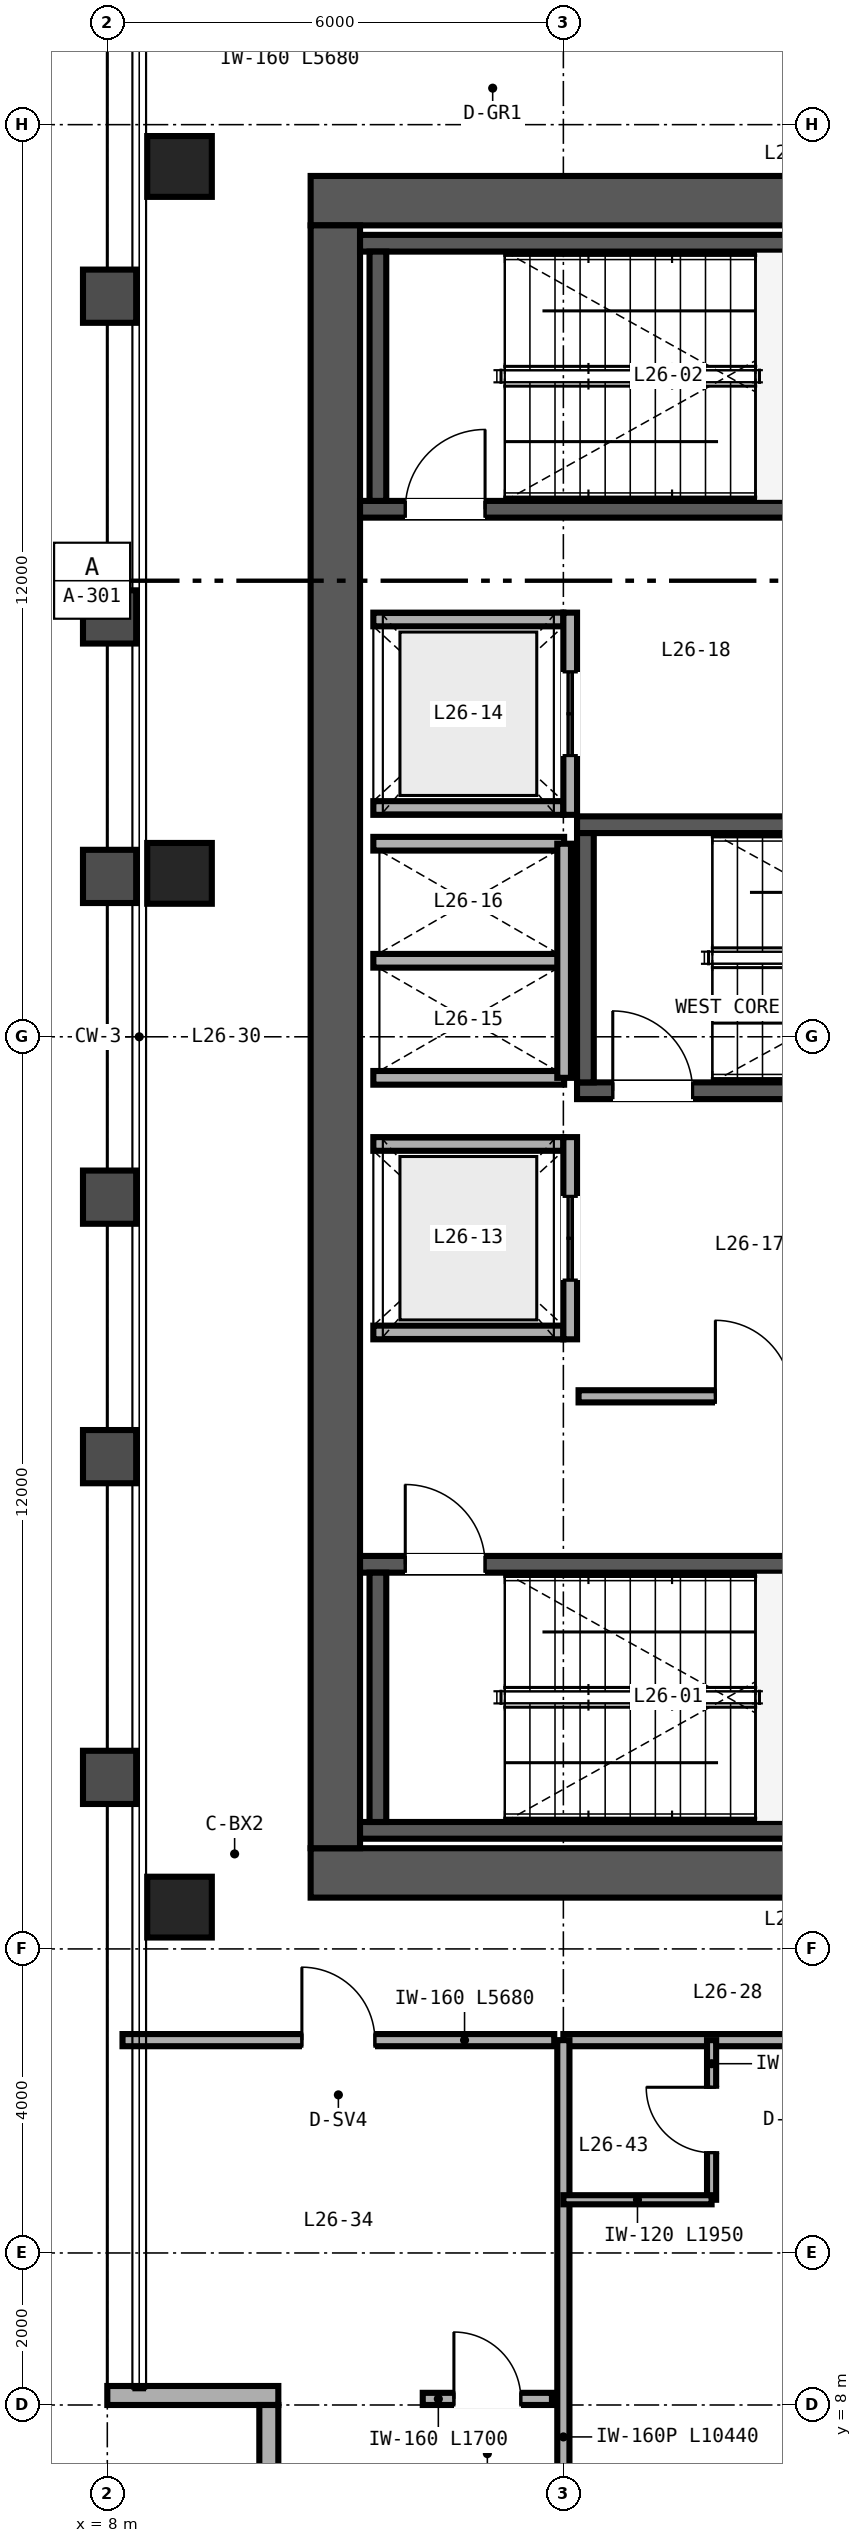
"""IFC4 building model, lengths in metres.
Left out: names, types, materials, properties, quantities, classifications, styles, units other than length and angle.
Written with IfcOpenShell. Run it as: python <this file> out.ifc"""

import sys

from ifc_helpers import new_model, si_unit, direction, frame, frame_2d, origin, origin_2d, place, context, subcontext, project, spatial, rectangle, hollow_rectangle, extrude, source, transform, mapped, element, fill, save


model = new_model("IFC4")
c1 = context("Model", 3, precision=1e-05, world=origin(), true_north=direction((0.0, 1.0)))
c2 = subcontext(c1, "Body", "Model", "MODEL_VIEW")
j1 = project(units=[si_unit("LENGTHUNIT", "METRE"), si_unit("PLANEANGLEUNIT", "RADIAN")], contexts=[c1])
p1 = place(None, origin())
s1 = spatial("IfcSite", under=j1, at=p1, CompositionType="ELEMENT")
p2 = place(p1, origin())
s2 = spatial("IfcBuilding", under=s1, at=p2, CompositionType="ELEMENT")
p3 = place(p2, frame((0.0, 0.0, 108.0)))
s3 = spatial("IfcBuildingStorey", under=s2, at=p3, CompositionType="ELEMENT", Elevation=108.0)
p4 = place(p3, frame((10.675, 15.0, 0.0), z_axis=(0.0, 0.0, 1.0), x_axis=(1.0, 0.0, 0.0)))
e1 = element("IfcWall", 1, at=p4, inside=s3, PredefinedType="SHEAR", context=c2, shape_type="SweptSolid", body=[
    extrude(rectangle(XDim=12.65, YDim=0.65, at=frame_2d((6.325, 0.0))), origin(), (0.0, 0.0, 1.0), 3.36),
])
p5 = place(p4, frame((10.225, 0.0, 0.0)))
e2 = element("IfcOpeningElement", 2, at=p5, cuts=e1, PredefinedType="OPENING", context=c2, shape_type="SweptSolid", body=[
    extrude(rectangle(XDim=1.0, YDim=2.15, at=frame_2d((0.5, 1.075))), frame((0.0, 0.335, 0.0), z_axis=(0.0, -1.0, 0.0), x_axis=(1.0, 0.0, 0.0)), (0.0, 0.0, 1.0), 0.67),
])
p6 = place(p3, frame((10.675, 37.0, 0.0), z_axis=(0.0, 0.0, 1.0), x_axis=(1.0, 0.0, 0.0)))
e3 = element("IfcWall", 3, at=p6, inside=s3, PredefinedType="SHEAR", context=c2, shape_type="SweptSolid", body=[
    extrude(rectangle(XDim=12.65, YDim=0.65, at=frame_2d((6.325, 0.0))), origin(), (0.0, 0.0, 1.0), 3.36),
])
p7 = place(p6, frame((8.905, 0.0, 0.0)))
e4 = element("IfcOpeningElement", 4, at=p7, cuts=e3, PredefinedType="OPENING", context=c2, shape_type="SweptSolid", body=[
    extrude(rectangle(XDim=1.0, YDim=2.15, at=frame_2d((0.5, 1.075))), frame((0.0, 0.335, 0.0), z_axis=(0.0, -1.0, 0.0), x_axis=(1.0, 0.0, 0.0)), (0.0, 0.0, 1.0), 0.67),
])
p8 = place(p3, frame((11.0, 15.325, 0.0), z_axis=(0.0, 0.0, 1.0), x_axis=(0.0, 1.0, 0.0)))
e5 = element("IfcWall", 5, at=p8, inside=s3, PredefinedType="SHEAR", context=c2, shape_type="SweptSolid", body=[
    extrude(rectangle(XDim=21.35, YDim=0.65, at=frame_2d((10.675, 0.0))), origin(), (0.0, 0.0, 1.0), 3.36),
])
p9 = place(p3, frame((11.325, 15.56, 0.0), z_axis=(0.0, 0.0, 1.0), x_axis=(1.0, 0.0, 0.0)))
e6 = element("IfcWall", 6, at=p9, inside=s3, PredefinedType="SHEAR", context=c2, shape_type="SweptSolid", body=[
    extrude(rectangle(XDim=7.985, YDim=0.22, at=frame_2d((3.993, 0.0))), origin(), (0.0, 0.0, 1.0), 3.4),
])
p10 = place(p3, frame((11.325, 19.06, 0.0), z_axis=(0.0, 0.0, 1.0), x_axis=(1.0, 0.0, 0.0)))
e7 = element("IfcWall", 7, at=p10, inside=s3, PredefinedType="SHEAR", context=c2, shape_type="SweptSolid", body=[
    extrude(rectangle(XDim=7.985, YDim=0.22, at=frame_2d((3.993, 0.0))), origin(), (0.0, 0.0, 1.0), 3.4),
])
p11 = place(p10, frame((0.595, 0.0, 0.0)))
e8 = element("IfcOpeningElement", 8, at=p11, cuts=e7, PredefinedType="OPENING", context=c2, shape_type="SweptSolid", body=[
    extrude(rectangle(XDim=1.05, YDim=2.15, at=frame_2d((0.525, 1.075))), frame((0.0, 0.12, 0.0), z_axis=(0.0, -1.0, 0.0), x_axis=(1.0, 0.0, 0.0)), (0.0, 0.0, 1.0), 0.24),
])
p12 = place(p3, frame((11.56, 15.67, 0.0), z_axis=(0.0, 0.0, 1.0), x_axis=(0.0, 1.0, 0.0)))
e9 = element("IfcWall", 9, at=p12, inside=s3, PredefinedType="SHEAR", context=c2, shape_type="SweptSolid", body=[
    extrude(rectangle(XDim=3.28, YDim=0.22, at=frame_2d((1.64, 0.0))), origin(), (0.0, 0.0, 1.0), 3.4),
])
p13 = place(p3, frame((11.325, 32.94, 0.0), z_axis=(0.0, 0.0, 1.0), x_axis=(1.0, 0.0, 0.0)))
e10 = element("IfcWall", 10, at=p13, inside=s3, PredefinedType="SHEAR", context=c2, shape_type="SweptSolid", body=[
    extrude(rectangle(XDim=7.985, YDim=0.22, at=frame_2d((3.993, 0.0))), origin(), (0.0, 0.0, 1.0), 3.4),
])
p14 = place(p13, frame((0.595, 0.0, 0.0)))
e11 = element("IfcOpeningElement", 11, at=p14, cuts=e10, PredefinedType="OPENING", context=c2, shape_type="SweptSolid", body=[
    extrude(rectangle(XDim=1.05, YDim=2.15, at=frame_2d((0.525, 1.075))), frame((0.0, 0.12, 0.0), z_axis=(0.0, -1.0, 0.0), x_axis=(1.0, 0.0, 0.0)), (0.0, 0.0, 1.0), 0.24),
])
p15 = place(p3, frame((11.325, 36.44, 0.0), z_axis=(0.0, 0.0, 1.0), x_axis=(1.0, 0.0, 0.0)))
e12 = element("IfcWall", 12, at=p15, inside=s3, PredefinedType="SHEAR", context=c2, shape_type="SweptSolid", body=[
    extrude(rectangle(XDim=7.985, YDim=0.22, at=frame_2d((3.993, 0.0))), origin(), (0.0, 0.0, 1.0), 3.4),
])
p16 = place(p3, frame((11.56, 33.05, 0.0), z_axis=(0.0, 0.0, 1.0), x_axis=(0.0, 1.0, 0.0)))
e13 = element("IfcWall", 13, at=p16, inside=s3, PredefinedType="SHEAR", context=c2, shape_type="SweptSolid", body=[
    extrude(rectangle(XDim=3.28, YDim=0.22, at=frame_2d((1.64, 0.0))), origin(), (0.0, 0.0, 1.0), 3.4),
])
p17 = place(p3, frame((14.18, 25.29, 0.0), z_axis=(0.0, 0.0, 1.0), x_axis=(1.0, 0.0, 0.0)))
e14 = element("IfcWall", 14, at=p17, inside=s3, PredefinedType="SHEAR", context=c2, shape_type="SweptSolid", body=[
    extrude(rectangle(XDim=8.495, YDim=0.22, at=frame_2d((4.248, 0.0))), origin(), (0.0, 0.0, 1.0), 3.4),
])
p18 = place(p17, frame((0.47, 0.0, 0.0)))
e15 = element("IfcOpeningElement", 15, at=p18, cuts=e14, PredefinedType="OPENING", context=c2, shape_type="SweptSolid", body=[
    extrude(rectangle(XDim=1.05, YDim=2.15, at=frame_2d((0.525, 1.075))), frame((0.0, 0.12, 0.0), z_axis=(0.0, -1.0, 0.0), x_axis=(1.0, 0.0, 0.0)), (0.0, 0.0, 1.0), 0.24),
])
p19 = place(p3, frame((14.18, 28.79, 0.0), z_axis=(0.0, 0.0, 1.0), x_axis=(1.0, 0.0, 0.0)))
e16 = element("IfcWall", 16, at=p19, inside=s3, PredefinedType="SHEAR", context=c2, shape_type="SweptSolid", body=[
    extrude(rectangle(XDim=8.495, YDim=0.22, at=frame_2d((4.248, 0.0))), origin(), (0.0, 0.0, 1.0), 3.4),
])
p20 = place(p3, frame((14.29, 25.4, 0.0), z_axis=(0.0, 0.0, 1.0), x_axis=(0.0, 1.0, 0.0)))
e17 = element("IfcWall", 17, at=p20, inside=s3, PredefinedType="SHEAR", context=c2, shape_type="SweptSolid", body=[
    extrude(rectangle(XDim=3.28, YDim=0.22, at=frame_2d((1.64, 0.0))), origin(), (0.0, 0.0, 1.0), 3.4),
])
m1 = source(origin(), c2, "Body", "SweptSolid", [
    extrude(hollow_rectangle(XDim=0.85, YDim=0.8, WallThickness=0.032, at=origin_2d()), origin(), (0.0, 0.0, 1.0), 3.36),
])
for number, where, z_axis, x_axis in (
    (18, (8.95, 14.55, 0.0), (0.0, 0.0, 1.0), (1.0, 0.0, 0.0)),
    (19, (8.95, 28.15, 0.0), (0.0, 0.0, 1.0), (1.0, 0.0, 0.0)),
    (20, (8.95, 37.45, 0.0), (0.0, 0.0, 1.0), (1.0, 0.0, 0.0)),
):
    element("IfcColumn", number, at=place(p3, frame(where, z_axis=z_axis, x_axis=x_axis)), inside=s3, PredefinedType="COLUMN", context=c2, shape_type="MappedRepresentation", body=[
        mapped(m1, transform((0.0, 0.0, 0.0), scale=1.0)),
    ])
p21 = place(p3, frame((8.0, 8.125, 0.0), z_axis=(0.0, 0.0, 1.0), x_axis=(1.0, 0.0, 0.0)))
e21 = element("IfcWall", 21, at=p21, inside=s3, PredefinedType="SOLIDWALL", context=c2, shape_type="SweptSolid", body=[
    extrude(rectangle(XDim=2.25, YDim=0.25, at=frame_2d((1.125, 0.0))), origin(), (0.0, 0.0, 1.0), 3.36),
])
p22 = place(p3, frame((10.125, 8.0, 0.0), z_axis=(0.0, 0.0, 1.0), x_axis=(0.0, -1.0, 0.0)))
e22 = element("IfcWall", 22, at=p22, inside=s3, PredefinedType="SOLIDWALL", context=c2, shape_type="SweptSolid", body=[
    extrude(rectangle(XDim=2.0, YDim=0.25, at=frame_2d((1.0, 0.0))), origin(), (0.0, 0.0, 1.0), 3.36),
])
for number, where, z_axis, x_axis in (
    (23, (11.5, 22.11, 0.0), (0.0, 0.0, 1.0), (1.0, 0.0, 0.0)),
    (24, (11.5, 24.59, 0.0), (0.0, 0.0, 1.0), (1.0, 0.0, 0.0)),
):
    element("IfcWall", number, at=place(p3, frame(where, z_axis=z_axis, x_axis=x_axis)), inside=s3, PredefinedType="SOLIDWALL", context=c2, shape_type="SweptSolid", body=[
        extrude(rectangle(XDim=2.5, YDim=0.18, at=frame_2d((1.25, 0.0))), origin(), (0.0, 0.0, 1.0), 3.36),
    ])
p23 = place(p3, frame((14.09, 22.02, 0.0), z_axis=(0.0, 0.0, 1.0), x_axis=(0.0, 1.0, 0.0)))
e25 = element("IfcWall", 25, at=p23, inside=s3, PredefinedType="SOLIDWALL", context=c2, shape_type="SweptSolid", body=[
    extrude(rectangle(XDim=2.66, YDim=0.18, at=frame_2d((1.33, 0.0))), origin(), (0.0, 0.0, 1.0), 3.36),
])
p24 = place(p23, frame((0.78, 0.0, 0.0)))
e26 = element("IfcOpeningElement", 26, at=p24, cuts=e25, PredefinedType="OPENING", context=c2, shape_type="SweptSolid", body=[
    extrude(rectangle(XDim=1.1, YDim=2.2, at=frame_2d((0.55, 1.1))), frame((0.0, 0.1, 0.0), z_axis=(0.0, -1.0, 0.0), x_axis=(1.0, 0.0, 0.0)), (0.0, 0.0, 1.0), 0.2),
])
for number, where, z_axis, x_axis in (
    (27, (11.5, 29.01, 0.0), (0.0, 0.0, 1.0), (1.0, 0.0, 0.0)),
    (28, (11.5, 31.49, 0.0), (0.0, 0.0, 1.0), (1.0, 0.0, 0.0)),
):
    element("IfcWall", number, at=place(p3, frame(where, z_axis=z_axis, x_axis=x_axis)), inside=s3, PredefinedType="SOLIDWALL", context=c2, shape_type="SweptSolid", body=[
        extrude(rectangle(XDim=2.5, YDim=0.18, at=frame_2d((1.25, 0.0))), origin(), (0.0, 0.0, 1.0), 3.36),
    ])
p25 = place(p3, frame((14.09, 28.92, 0.0), z_axis=(0.0, 0.0, 1.0), x_axis=(0.0, 1.0, 0.0)))
e29 = element("IfcWall", 29, at=p25, inside=s3, PredefinedType="SOLIDWALL", context=c2, shape_type="SweptSolid", body=[
    extrude(rectangle(XDim=2.66, YDim=0.18, at=frame_2d((1.33, 0.0))), origin(), (0.0, 0.0, 1.0), 3.36),
])
p26 = place(p25, frame((0.78, 0.0, 0.0)))
e30 = element("IfcOpeningElement", 30, at=p26, cuts=e29, PredefinedType="OPENING", context=c2, shape_type="SweptSolid", body=[
    extrude(rectangle(XDim=1.1, YDim=2.2, at=frame_2d((0.55, 1.1))), frame((0.0, 0.1, 0.0), z_axis=(0.0, -1.0, 0.0), x_axis=(1.0, 0.0, 0.0)), (0.0, 0.0, 1.0), 0.2),
])
for number, where, z_axis, x_axis in (
    (31, (11.5, 25.46, 0.0), (0.0, 0.0, 1.0), (1.0, 0.0, 0.0)),
    (32, (11.5, 27.0, 0.0), (0.0, 0.0, 1.0), (1.0, 0.0, 0.0)),
    (33, (11.5, 28.54, 0.0), (0.0, 0.0, 1.0), (1.0, 0.0, 0.0)),
):
    element("IfcWall", number, at=place(p3, frame(where, z_axis=z_axis, x_axis=x_axis)), inside=s3, PredefinedType="SOLIDWALL", context=c2, shape_type="SweptSolid", body=[
        extrude(rectangle(XDim=2.51, YDim=0.18, at=frame_2d((1.255, 0.0))), origin(), (0.0, 0.0, 1.0), 3.36),
    ])
p27 = place(p3, frame((14.01, 25.46, 0.0), z_axis=(0.0, 0.0, 1.0), x_axis=(0.0, 1.0, 0.0)))
e34 = element("IfcWall", 34, at=p27, inside=s3, PredefinedType="SOLIDWALL", context=c2, shape_type="SweptSolid", body=[
    extrude(rectangle(XDim=3.08, YDim=0.18, at=frame_2d((1.54, 0.0))), origin(), (0.0, 0.0, 1.0), 3.36),
])
p28 = place(p3, frame((14.2, 21.27, 0.0), z_axis=(0.0, 0.0, 1.0), x_axis=(1.0, 0.0, 0.0)))
e35 = element("IfcWall", 35, at=p28, inside=s3, PredefinedType="PARTITIONING", context=c2, shape_type="SweptSolid", body=[
    extrude(rectangle(XDim=4.58, YDim=0.16, at=frame_2d((2.29, 0.0))), origin(), (0.0, 0.0, 1.0), 3.36),
])
p29 = place(p28, frame((1.8, 0.0, 0.0)))
e36 = element("IfcOpeningElement", 36, at=p29, cuts=e35, PredefinedType="OPENING", context=c2, shape_type="SweptSolid", body=[
    extrude(rectangle(XDim=1.0, YDim=2.15, at=frame_2d((0.5, 1.075))), frame((0.0, 0.09, 0.0), z_axis=(0.0, -1.0, 0.0), x_axis=(1.0, 0.0, 0.0)), (0.0, 0.0, 1.0), 0.18),
])
p30 = place(p3, frame((8.2, 12.8, 0.0), z_axis=(0.0, 0.0, 1.0), x_axis=(1.0, 0.0, 0.0)))
e37 = element("IfcWall", 37, at=p30, inside=s3, PredefinedType="PARTITIONING", context=c2, shape_type="SweptSolid", body=[
    extrude(rectangle(XDim=5.68, YDim=0.16, at=frame_2d((2.84, 0.0))), origin(), (0.0, 0.0, 1.0), 3.36),
])
p31 = place(p30, frame((2.36, 0.0, 0.0)))
e38 = element("IfcOpeningElement", 38, at=p31, cuts=e37, PredefinedType="OPENING", context=c2, shape_type="SweptSolid", body=[
    extrude(rectangle(XDim=0.96, YDim=2.15, at=frame_2d((0.48, 1.075))), frame((0.0, 0.09, 0.0), z_axis=(0.0, -1.0, 0.0), x_axis=(1.0, 0.0, 0.0)), (0.0, 0.0, 1.0), 0.18),
])
p32 = place(p3, frame((12.15, 8.08, 0.0), z_axis=(0.0, 0.0, 1.0), x_axis=(1.0, 0.0, 0.0)))
e39 = element("IfcWall", 39, at=p32, inside=s3, PredefinedType="PARTITIONING", context=c2, shape_type="SweptSolid", body=[
    extrude(rectangle(XDim=1.7, YDim=0.16, at=frame_2d((0.85, 0.0))), origin(), (0.0, 0.0, 1.0), 3.36),
])
p33 = place(p32, frame((0.41, 0.0, 0.0)))
e40 = element("IfcOpeningElement", 40, at=p33, cuts=e39, PredefinedType="OPENING", context=c2, shape_type="SweptSolid", body=[
    extrude(rectangle(XDim=0.88, YDim=2.15, at=frame_2d((0.44, 1.075))), frame((0.0, 0.09, 0.0), z_axis=(0.0, -1.0, 0.0), x_axis=(1.0, 0.0, 0.0)), (0.0, 0.0, 1.0), 0.18),
])
p34 = place(p3, frame((14.0, 12.8, 0.0), z_axis=(0.0, 0.0, 1.0), x_axis=(1.0, 0.0, 0.0)))
e41 = element("IfcWall", 41, at=p34, inside=s3, PredefinedType="PARTITIONING", context=c2, shape_type="SweptSolid", body=[
    extrude(rectangle(XDim=36.0, YDim=0.16, at=frame_2d((18.0, 0.0))), origin(), (0.0, 0.0, 1.0), 2.581),
])
p35 = place(p34, frame((7.75, 0.0, 0.0)))
e42 = element("IfcOpeningElement", 42, at=p35, cuts=e41, PredefinedType="OPENING", context=c2, shape_type="SweptSolid", body=[
    extrude(rectangle(XDim=0.98, YDim=2.2, at=frame_2d((0.49, 1.1))), frame((0.0, 0.09, 0.0), z_axis=(0.0, -1.0, 0.0), x_axis=(1.0, 0.0, 0.0)), (0.0, 0.0, 1.0), 0.18),
])
p36 = place(p34, frame((16.9, 0.0, 0.0)))
e43 = element("IfcOpeningElement", 43, at=p36, cuts=e41, PredefinedType="OPENING", context=c2, shape_type="SweptSolid", body=[
    extrude(rectangle(XDim=0.98, YDim=2.2, at=frame_2d((0.49, 1.1))), frame((0.0, 0.09, 0.0), z_axis=(0.0, -1.0, 0.0), x_axis=(1.0, 0.0, 0.0)), (0.0, 0.0, 1.0), 0.18),
])
p37 = place(p34, frame((24.65, 0.0, 0.0)))
e44 = element("IfcOpeningElement", 44, at=p37, cuts=e41, PredefinedType="OPENING", context=c2, shape_type="SweptSolid", body=[
    extrude(rectangle(XDim=0.98, YDim=2.2, at=frame_2d((0.49, 1.1))), frame((0.0, 0.09, 0.0), z_axis=(0.0, -1.0, 0.0), x_axis=(1.0, 0.0, 0.0)), (0.0, 0.0, 1.0), 0.18),
])
p38 = place(p34, frame((34.7, 0.0, 0.0)))
e45 = element("IfcOpeningElement", 45, at=p38, cuts=e41, PredefinedType="OPENING", context=c2, shape_type="SweptSolid", body=[
    extrude(rectangle(XDim=0.98, YDim=2.2, at=frame_2d((0.49, 1.1))), frame((0.0, 0.09, 0.0), z_axis=(0.0, -1.0, 0.0), x_axis=(1.0, 0.0, 0.0)), (0.0, 0.0, 1.0), 0.18),
])
p39 = place(p3, frame((14.0, 2.36, 0.0), z_axis=(0.0, 0.0, 1.0), x_axis=(0.0, 1.0, 0.0)))
e46 = element("IfcWall", 46, at=p39, inside=s3, PredefinedType="PARTITIONING", context=c2, shape_type="SweptSolid", body=[
    extrude(rectangle(XDim=10.44, YDim=0.16, at=frame_2d((5.22, 0.0))), origin(), (0.0, 0.0, 1.0), 2.667),
])
p40 = place(p3, frame((15.95, 10.7, 0.0), z_axis=(0.0, 0.0, 1.0), x_axis=(0.0, 1.0, 0.0)))
e47 = element("IfcWall", 47, at=p40, inside=s3, PredefinedType="PARTITIONING", context=c2, shape_type="SweptSolid", body=[
    extrude(rectangle(XDim=2.1, YDim=0.12, at=frame_2d((1.05, 0.0))), origin(), (0.0, 0.0, 1.0), 3.36),
])
p41 = place(p40, frame((0.62, 0.0, 0.0)))
e48 = element("IfcOpeningElement", 48, at=p41, cuts=e47, PredefinedType="OPENING", context=c2, shape_type="SweptSolid", body=[
    extrude(rectangle(XDim=0.86, YDim=2.1, at=frame_2d((0.43, 1.05))), frame((0.0, 0.07, 0.0), z_axis=(0.0, -1.0, 0.0), x_axis=(1.0, 0.0, 0.0)), (0.0, 0.0, 1.0), 0.14),
])
p42 = place(p3, frame((14.0, 10.7, 0.0), z_axis=(0.0, 0.0, 1.0), x_axis=(1.0, 0.0, 0.0)))
e49 = element("IfcWall", 49, at=p42, inside=s3, PredefinedType="PARTITIONING", context=c2, shape_type="SweptSolid", body=[
    extrude(rectangle(XDim=1.95, YDim=0.12, at=frame_2d((0.975, 0.0))), origin(), (0.0, 0.0, 1.0), 3.36),
])
m2 = source(origin(), c2, "Body", "SweptSolid", [
    extrude(rectangle(XDim=1.05, YDim=2.15, at=frame_2d((0.525, 1.075))), frame((0.0, 0.025, 0.0), z_axis=(0.0, -1.0, 0.0), x_axis=(1.0, 0.0, 0.0)), (0.0, 0.0, 1.0), 0.05),
])
p43 = place(p11, origin())
e50 = element("IfcDoor", 50, at=p43, inside=s3, OperationType="SINGLE_SWING_LEFT", PredefinedType="DOOR", context=c2, shape_type="MappedRepresentation", body=[
    mapped(m2, transform((0.0, 0.0, 0.0), scale=1.0)),
])
fill(e8, e50)
p44 = place(p14, origin())
e51 = element("IfcDoor", 51, at=p44, inside=s3, OperationType="SINGLE_SWING_RIGHT", PredefinedType="DOOR", context=c2, shape_type="MappedRepresentation", body=[
    mapped(m2, transform((0.0, 0.0, 0.0), scale=1.0)),
])
fill(e11, e51)
p45 = place(p18, origin())
e52 = element("IfcDoor", 52, at=p45, inside=s3, OperationType="SINGLE_SWING_LEFT", PredefinedType="DOOR", context=c2, shape_type="MappedRepresentation", body=[
    mapped(m2, transform((0.0, 0.0, 0.0), scale=1.0)),
])
fill(e15, e52)
m3 = source(origin(), c2, "Body", "SweptSolid", [
    extrude(rectangle(XDim=1.1, YDim=2.2, at=frame_2d((0.55, 1.1))), frame((0.0, 0.025, 0.0), z_axis=(0.0, -1.0, 0.0), x_axis=(1.0, 0.0, 0.0)), (0.0, 0.0, 1.0), 0.05),
])
p46 = place(p24, origin())
e53 = element("IfcDoor", 53, at=p46, inside=s3, OperationType="DOUBLE_DOOR_SLIDING", PredefinedType="DOOR", context=c2, shape_type="MappedRepresentation", body=[
    mapped(m3, transform((0.0, 0.0, 0.0), scale=1.0)),
])
fill(e26, e53)
p47 = place(p26, origin())
e54 = element("IfcDoor", 54, at=p47, inside=s3, OperationType="DOUBLE_DOOR_SLIDING", PredefinedType="DOOR", context=c2, shape_type="MappedRepresentation", body=[
    mapped(m3, transform((0.0, 0.0, 0.0), scale=1.0)),
])
fill(e30, e54)
m4 = source(origin(), c2, "Body", "SweptSolid", [
    extrude(rectangle(XDim=1.0, YDim=2.15, at=frame_2d((0.5, 1.075))), frame((0.0, 0.025, 0.0), z_axis=(0.0, -1.0, 0.0), x_axis=(1.0, 0.0, 0.0)), (0.0, 0.0, 1.0), 0.05),
])
p48 = place(p29, origin())
e55 = element("IfcDoor", 55, at=p48, inside=s3, OperationType="SINGLE_SWING_LEFT", PredefinedType="DOOR", context=c2, shape_type="MappedRepresentation", body=[
    mapped(m4, transform((0.0, 0.0, 0.0), scale=1.0)),
])
fill(e36, e55)
m5 = source(origin(), c2, "Body", "SweptSolid", [
    extrude(rectangle(XDim=0.96, YDim=2.15, at=frame_2d((0.48, 1.075))), frame((0.0, 0.025, 0.0), z_axis=(0.0, -1.0, 0.0), x_axis=(1.0, 0.0, 0.0)), (0.0, 0.0, 1.0), 0.05),
])
p49 = place(p31, origin())
e56 = element("IfcDoor", 56, at=p49, inside=s3, OperationType="SINGLE_SWING_LEFT", PredefinedType="DOOR", context=c2, shape_type="MappedRepresentation", body=[
    mapped(m5, transform((0.0, 0.0, 0.0), scale=1.0)),
])
fill(e38, e56)
m6 = source(origin(), c2, "Body", "SweptSolid", [
    extrude(rectangle(XDim=0.88, YDim=2.15, at=frame_2d((0.44, 1.075))), frame((0.0, 0.025, 0.0), z_axis=(0.0, -1.0, 0.0), x_axis=(1.0, 0.0, 0.0)), (0.0, 0.0, 1.0), 0.05),
])
p50 = place(p33, origin())
e57 = element("IfcDoor", 57, at=p50, inside=s3, OperationType="SINGLE_SWING_LEFT", PredefinedType="DOOR", context=c2, shape_type="MappedRepresentation", body=[
    mapped(m6, transform((0.0, 0.0, 0.0), scale=1.0)),
])
fill(e40, e57)
m7 = source(origin(), c2, "Body", "SweptSolid", [
    extrude(rectangle(XDim=0.86, YDim=2.1, at=frame_2d((0.43, 1.05))), frame((0.0, 0.025, 0.0), z_axis=(0.0, -1.0, 0.0), x_axis=(1.0, 0.0, 0.0)), (0.0, 0.0, 1.0), 0.05),
])
p51 = place(p41, origin())
e58 = element("IfcDoor", 58, at=p51, inside=s3, OperationType="SINGLE_SWING_RIGHT", PredefinedType="DOOR", context=c2, shape_type="MappedRepresentation", body=[
    mapped(m7, transform((0.0, 0.0, 0.0), scale=1.0)),
])
fill(e48, e58)
save(model, sys.argv[1])
